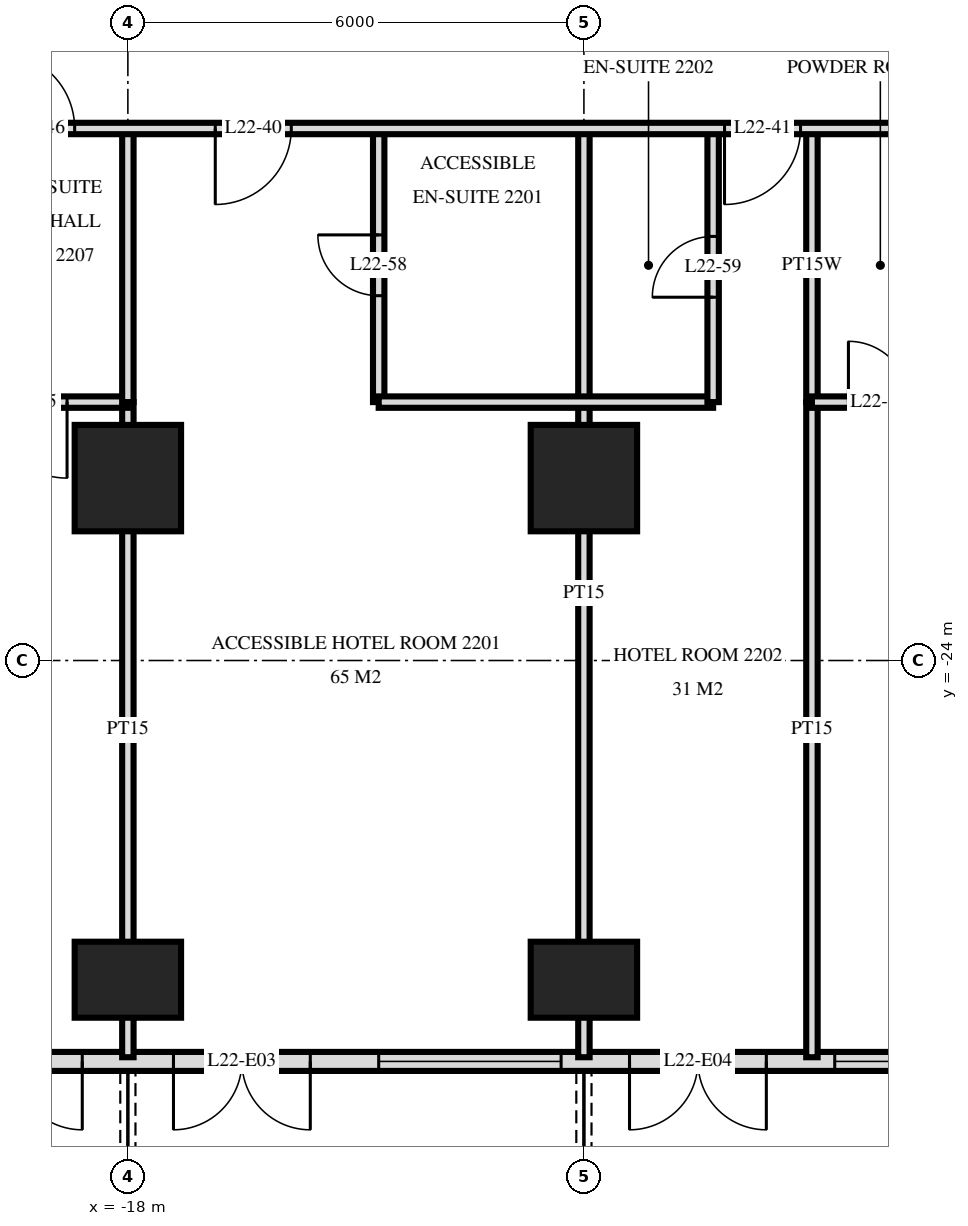
"""IFC4 building model, lengths in metres.
Left out: names, types, materials, properties, quantities, classifications, styles, units other than length and angle.
Written with IfcOpenShell. Run it as: python <this file> out.ifc"""

import sys

from ifc_helpers import new_model, si_unit, direction, frame, frame_2d, origin, origin_2d, place, context, subcontext, project, spatial, rectangle, extrude, element, fill, save


model = new_model("IFC4")
c1 = context("Model", 3, precision=1e-05, world=origin(), true_north=direction((0.0, 1.0)))
c2 = subcontext(c1, "Body", "Model", "MODEL_VIEW")
j1 = project(units=[si_unit("LENGTHUNIT", "METRE"), si_unit("PLANEANGLEUNIT", "RADIAN")], contexts=[c1])
p1 = place(None, origin())
s1 = spatial("IfcSite", under=j1, at=p1, CompositionType="ELEMENT")
p2 = place(p1, origin())
s2 = spatial("IfcBuilding", under=s1, at=p2, CompositionType="ELEMENT")
p3 = place(p2, frame((0.0, 0.0, 88.8)))
s3 = spatial("IfcBuildingStorey", under=s2, at=p3, CompositionType="ELEMENT", Elevation=88.8)
p4 = place(p3, frame((-18.0, -28.2, 0.0), z_axis=(0.0, 0.0, 1.0), x_axis=(1.0, 0.0, 0.0)))
e1 = element("IfcColumn", 1, at=p4, inside=s3, PredefinedType="COLUMN", context=c2, shape_type="SweptSolid", body=[
    extrude(rectangle(XDim=1.4, YDim=1.0, at=origin_2d()), origin(), (0.0, 0.0, 1.0), 3.6),
])
p5 = place(p3, frame((-18.0, -21.6, 0.0), z_axis=(0.0, 0.0, 1.0), x_axis=(1.0, 0.0, 0.0)))
e2 = element("IfcColumn", 2, at=p5, inside=s3, PredefinedType="COLUMN", context=c2, shape_type="SweptSolid", body=[
    extrude(rectangle(XDim=1.4, YDim=1.4, at=origin_2d()), origin(), (0.0, 0.0, 1.0), 3.6),
])
p6 = place(p3, frame((-12.0, -28.2, 0.0), z_axis=(0.0, 0.0, 1.0), x_axis=(1.0, 0.0, 0.0)))
e3 = element("IfcColumn", 3, at=p6, inside=s3, PredefinedType="COLUMN", context=c2, shape_type="SweptSolid", body=[
    extrude(rectangle(XDim=1.4, YDim=1.0, at=origin_2d()), origin(), (0.0, 0.0, 1.0), 3.6),
])
p7 = place(p3, frame((-12.0, -21.6, 0.0), z_axis=(0.0, 0.0, 1.0), x_axis=(1.0, 0.0, 0.0)))
e4 = element("IfcColumn", 4, at=p7, inside=s3, PredefinedType="COLUMN", context=c2, shape_type="SweptSolid", body=[
    extrude(rectangle(XDim=1.4, YDim=1.4, at=origin_2d()), origin(), (0.0, 0.0, 1.0), 3.6),
])
p8 = place(p3, frame((-28.775, -29.275, 0.0), z_axis=(0.0, 0.0, 1.0), x_axis=(1.0, 0.0, 0.0)))
e5 = element("IfcWall", 5, at=p8, inside=s3, PredefinedType="SOLIDWALL", context=c2, shape_type="SweptSolid", body=[
    extrude(rectangle(XDim=57.551, YDim=0.25, at=frame_2d((28.775, 0.0))), origin(), (0.0, 0.0, 1.0), 3.32),
])
p9 = place(p8, frame((0.575, 0.0, 0.0)))
e6 = element("IfcOpeningElement", 6, at=p9, cuts=e5, PredefinedType="OPENING", context=c2, shape_type="SweptSolid", body=[
    extrude(rectangle(XDim=1.8, YDim=2.4, at=frame_2d((0.9, 1.2))), frame((0.0, 0.135, 0.0), z_axis=(0.0, -1.0, 0.0), x_axis=(1.0, 0.0, 0.0)), (0.0, 0.0, 1.0), 0.27),
])
p10 = place(p8, frame((5.075, 0.0, 0.3)))
e7 = element("IfcOpeningElement", 7, at=p10, cuts=e5, PredefinedType="OPENING", context=c2, shape_type="SweptSolid", body=[
    extrude(rectangle(XDim=2.4, YDim=2.1, at=frame_2d((1.2, 1.05))), frame((0.0, 0.135, 0.0), z_axis=(0.0, -1.0, 0.0), x_axis=(1.0, 0.0, 0.0)), (0.0, 0.0, 1.0), 0.27),
])
p11 = place(p8, frame((8.375, 0.0, 0.0)))
e8 = element("IfcOpeningElement", 8, at=p11, cuts=e5, PredefinedType="OPENING", context=c2, shape_type="SweptSolid", body=[
    extrude(rectangle(XDim=1.8, YDim=2.4, at=frame_2d((0.9, 1.2))), frame((0.0, 0.135, 0.0), z_axis=(0.0, -1.0, 0.0), x_axis=(1.0, 0.0, 0.0)), (0.0, 0.0, 1.0), 0.27),
])
p12 = place(p8, frame((11.375, 0.0, 0.0)))
e9 = element("IfcOpeningElement", 9, at=p12, cuts=e5, PredefinedType="OPENING", context=c2, shape_type="SweptSolid", body=[
    extrude(rectangle(XDim=1.8, YDim=2.4, at=frame_2d((0.9, 1.2))), frame((0.0, 0.135, 0.0), z_axis=(0.0, -1.0, 0.0), x_axis=(1.0, 0.0, 0.0)), (0.0, 0.0, 1.0), 0.27),
])
p13 = place(p8, frame((14.075, 0.0, 0.3)))
e10 = element("IfcOpeningElement", 10, at=p13, cuts=e5, PredefinedType="OPENING", context=c2, shape_type="SweptSolid", body=[
    extrude(rectangle(XDim=2.4, YDim=2.1, at=frame_2d((1.2, 1.05))), frame((0.0, 0.135, 0.0), z_axis=(0.0, -1.0, 0.0), x_axis=(1.0, 0.0, 0.0)), (0.0, 0.0, 1.0), 0.27),
])
p14 = place(p8, frame((17.375, 0.0, 0.0)))
e11 = element("IfcOpeningElement", 11, at=p14, cuts=e5, PredefinedType="OPENING", context=c2, shape_type="SweptSolid", body=[
    extrude(rectangle(XDim=1.8, YDim=2.4, at=frame_2d((0.9, 1.2))), frame((0.0, 0.135, 0.0), z_axis=(0.0, -1.0, 0.0), x_axis=(1.0, 0.0, 0.0)), (0.0, 0.0, 1.0), 0.27),
])
p15 = place(p8, frame((20.075, 0.0, 0.3)))
e12 = element("IfcOpeningElement", 12, at=p15, cuts=e5, PredefinedType="OPENING", context=c2, shape_type="SweptSolid", body=[
    extrude(rectangle(XDim=2.4, YDim=2.1, at=frame_2d((1.2, 1.05))), frame((0.0, 0.135, 0.0), z_axis=(0.0, -1.0, 0.0), x_axis=(1.0, 0.0, 0.0)), (0.0, 0.0, 1.0), 0.27),
])
p16 = place(p8, frame((23.075, 0.0, 0.3)))
e13 = element("IfcOpeningElement", 13, at=p16, cuts=e5, PredefinedType="OPENING", context=c2, shape_type="SweptSolid", body=[
    extrude(rectangle(XDim=2.4, YDim=2.1, at=frame_2d((1.2, 1.05))), frame((0.0, 0.135, 0.0), z_axis=(0.0, -1.0, 0.0), x_axis=(1.0, 0.0, 0.0)), (0.0, 0.0, 1.0), 0.27),
])
p17 = place(p8, frame((26.375, 0.0, 0.0)))
e14 = element("IfcOpeningElement", 14, at=p17, cuts=e5, PredefinedType="OPENING", context=c2, shape_type="SweptSolid", body=[
    extrude(rectangle(XDim=1.8, YDim=2.4, at=frame_2d((0.9, 1.2))), frame((0.0, 0.135, 0.0), z_axis=(0.0, -1.0, 0.0), x_axis=(1.0, 0.0, 0.0)), (0.0, 0.0, 1.0), 0.27),
])
p18 = place(p8, frame((29.375, 0.0, 0.0)))
e15 = element("IfcOpeningElement", 15, at=p18, cuts=e5, PredefinedType="OPENING", context=c2, shape_type="SweptSolid", body=[
    extrude(rectangle(XDim=1.8, YDim=2.4, at=frame_2d((0.9, 1.2))), frame((0.0, 0.135, 0.0), z_axis=(0.0, -1.0, 0.0), x_axis=(1.0, 0.0, 0.0)), (0.0, 0.0, 1.0), 0.27),
])
p19 = place(p8, frame((32.075, 0.0, 0.3)))
e16 = element("IfcOpeningElement", 16, at=p19, cuts=e5, PredefinedType="OPENING", context=c2, shape_type="SweptSolid", body=[
    extrude(rectangle(XDim=2.4, YDim=2.1, at=frame_2d((1.2, 1.05))), frame((0.0, 0.135, 0.0), z_axis=(0.0, -1.0, 0.0), x_axis=(1.0, 0.0, 0.0)), (0.0, 0.0, 1.0), 0.27),
])
p20 = place(p8, frame((35.375, 0.0, 0.0)))
e17 = element("IfcOpeningElement", 17, at=p20, cuts=e5, PredefinedType="OPENING", context=c2, shape_type="SweptSolid", body=[
    extrude(rectangle(XDim=1.8, YDim=2.4, at=frame_2d((0.9, 1.2))), frame((0.0, 0.135, 0.0), z_axis=(0.0, -1.0, 0.0), x_axis=(1.0, 0.0, 0.0)), (0.0, 0.0, 1.0), 0.27),
])
p21 = place(p8, frame((38.075, 0.0, 0.3)))
e18 = element("IfcOpeningElement", 18, at=p21, cuts=e5, PredefinedType="OPENING", context=c2, shape_type="SweptSolid", body=[
    extrude(rectangle(XDim=2.4, YDim=2.1, at=frame_2d((1.2, 1.05))), frame((0.0, 0.135, 0.0), z_axis=(0.0, -1.0, 0.0), x_axis=(1.0, 0.0, 0.0)), (0.0, 0.0, 1.0), 0.27),
])
p22 = place(p8, frame((41.075, 0.0, 0.3)))
e19 = element("IfcOpeningElement", 19, at=p22, cuts=e5, PredefinedType="OPENING", context=c2, shape_type="SweptSolid", body=[
    extrude(rectangle(XDim=2.4, YDim=2.1, at=frame_2d((1.2, 1.05))), frame((0.0, 0.135, 0.0), z_axis=(0.0, -1.0, 0.0), x_axis=(1.0, 0.0, 0.0)), (0.0, 0.0, 1.0), 0.27),
])
p23 = place(p8, frame((44.375, 0.0, 0.0)))
e20 = element("IfcOpeningElement", 20, at=p23, cuts=e5, PredefinedType="OPENING", context=c2, shape_type="SweptSolid", body=[
    extrude(rectangle(XDim=1.8, YDim=2.4, at=frame_2d((0.9, 1.2))), frame((0.0, 0.135, 0.0), z_axis=(0.0, -1.0, 0.0), x_axis=(1.0, 0.0, 0.0)), (0.0, 0.0, 1.0), 0.27),
])
p24 = place(p8, frame((47.075, 0.0, 0.3)))
e21 = element("IfcOpeningElement", 21, at=p24, cuts=e5, PredefinedType="OPENING", context=c2, shape_type="SweptSolid", body=[
    extrude(rectangle(XDim=2.4, YDim=2.1, at=frame_2d((1.2, 1.05))), frame((0.0, 0.135, 0.0), z_axis=(0.0, -1.0, 0.0), x_axis=(1.0, 0.0, 0.0)), (0.0, 0.0, 1.0), 0.27),
])
p25 = place(p8, frame((50.375, 0.0, 0.0)))
e22 = element("IfcOpeningElement", 22, at=p25, cuts=e5, PredefinedType="OPENING", context=c2, shape_type="SweptSolid", body=[
    extrude(rectangle(XDim=1.8, YDim=2.4, at=frame_2d((0.9, 1.2))), frame((0.0, 0.135, 0.0), z_axis=(0.0, -1.0, 0.0), x_axis=(1.0, 0.0, 0.0)), (0.0, 0.0, 1.0), 0.27),
])
p26 = place(p8, frame((53.375, 0.0, 0.0)))
e23 = element("IfcOpeningElement", 23, at=p26, cuts=e5, PredefinedType="OPENING", context=c2, shape_type="SweptSolid", body=[
    extrude(rectangle(XDim=1.8, YDim=2.4, at=frame_2d((0.9, 1.2))), frame((0.0, 0.135, 0.0), z_axis=(0.0, -1.0, 0.0), x_axis=(1.0, 0.0, 0.0)), (0.0, 0.0, 1.0), 0.27),
])
p27 = place(p3, frame((-9.0, -29.22, 0.0), z_axis=(0.0, 0.0, 1.0), x_axis=(0.0, 1.0, 0.0)))
e24 = element("IfcWall", 24, at=p27, inside=s3, PredefinedType="PARTITIONING", context=c2, shape_type="SweptSolid", body=[
    extrude(rectangle(XDim=8.62, YDim=0.15, at=frame_2d((4.31, 0.0))), origin(), (0.0, 0.0, 1.0), 3.32),
])
p28 = place(p3, frame((-9.0, -20.6, 0.0), z_axis=(0.0, 0.0, 1.0), x_axis=(0.0, 1.0, 0.0)))
e25 = element("IfcWall", 25, at=p28, inside=s3, PredefinedType="PLUMBINGWALL", context=c2, shape_type="SweptSolid", body=[
    extrude(rectangle(XDim=3.6, YDim=0.15, at=frame_2d((1.8, 0.0))), origin(), (0.0, 0.0, 1.0), 3.32),
])
p29 = place(p3, frame((-10.3, -20.6, 0.0), z_axis=(0.0, 0.0, 1.0), x_axis=(0.0, 1.0, 0.0)))
e26 = element("IfcWall", 26, at=p29, inside=s3, PredefinedType="PARTITIONING", context=c2, shape_type="SweptSolid", body=[
    extrude(rectangle(XDim=3.6, YDim=0.15, at=frame_2d((1.8, 0.0))), origin(), (0.0, 0.0, 1.0), 3.32),
])
p30 = place(p29, frame((1.38, 0.0, 0.0)))
e27 = element("IfcOpeningElement", 27, at=p30, cuts=e26, PredefinedType="OPENING", context=c2, shape_type="SweptSolid", body=[
    extrude(rectangle(XDim=0.8, YDim=2.1, at=frame_2d((0.4, 1.05))), frame((0.0, 0.085, 0.0), z_axis=(0.0, -1.0, 0.0), x_axis=(1.0, 0.0, 0.0)), (0.0, 0.0, 1.0), 0.17),
])
p31 = place(p3, frame((-12.0, -29.22, 0.0), z_axis=(0.0, 0.0, 1.0), x_axis=(0.0, 1.0, 0.0)))
e28 = element("IfcWall", 28, at=p31, inside=s3, PredefinedType="PARTITIONING", context=c2, shape_type="SweptSolid", body=[
    extrude(rectangle(XDim=12.22, YDim=0.15, at=frame_2d((6.11, 0.0))), origin(), (0.0, 0.0, 1.0), 3.32),
])
p32 = place(p3, frame((-14.7, -20.6, 0.0), z_axis=(0.0, 0.0, 1.0), x_axis=(0.0, 1.0, 0.0)))
e29 = element("IfcWall", 29, at=p32, inside=s3, PredefinedType="PARTITIONING", context=c2, shape_type="SweptSolid", body=[
    extrude(rectangle(XDim=3.6, YDim=0.15, at=frame_2d((1.8, 0.0))), origin(), (0.0, 0.0, 1.0), 3.32),
])
p33 = place(p32, frame((1.4, 0.0, 0.0)))
e30 = element("IfcOpeningElement", 30, at=p33, cuts=e29, PredefinedType="OPENING", context=c2, shape_type="SweptSolid", body=[
    extrude(rectangle(XDim=0.8, YDim=2.1, at=frame_2d((0.4, 1.05))), frame((0.0, 0.085, 0.0), z_axis=(0.0, -1.0, 0.0), x_axis=(1.0, 0.0, 0.0)), (0.0, 0.0, 1.0), 0.17),
])
p34 = place(p3, frame((-18.0, -20.6, 0.0), z_axis=(0.0, 0.0, 1.0), x_axis=(0.0, 1.0, 0.0)))
e31 = element("IfcWall", 31, at=p34, inside=s3, PredefinedType="PARTITIONING", context=c2, shape_type="SweptSolid", body=[
    extrude(rectangle(XDim=3.6, YDim=0.15, at=frame_2d((1.8, 0.0))), origin(), (0.0, 0.0, 1.0), 3.32),
])
p35 = place(p3, frame((-18.0, -29.22, 0.0), z_axis=(0.0, 0.0, 1.0), x_axis=(0.0, 1.0, 0.0)))
e32 = element("IfcWall", 32, at=p35, inside=s3, PredefinedType="PARTITIONING", context=c2, shape_type="SweptSolid", body=[
    extrude(rectangle(XDim=8.62, YDim=0.15, at=frame_2d((4.31, 0.0))), origin(), (0.0, 0.0, 1.0), 3.32),
])
p36 = place(p3, frame((-20.4, -20.6, 0.0), z_axis=(0.0, 0.0, 1.0), x_axis=(1.0, 0.0, 0.0)))
e33 = element("IfcWall", 33, at=p36, inside=s3, PredefinedType="PARTITIONING", context=c2, shape_type="SweptSolid", body=[
    extrude(rectangle(XDim=2.4, YDim=0.15, at=frame_2d((1.2, 0.0))), origin(), (0.0, 0.0, 1.0), 3.32),
])
p37 = place(p36, frame((0.6, 0.0, 0.0)))
e34 = element("IfcOpeningElement", 34, at=p37, cuts=e33, PredefinedType="OPENING", context=c2, shape_type="SweptSolid", body=[
    extrude(rectangle(XDim=1.0, YDim=2.1, at=frame_2d((0.5, 1.05))), frame((0.0, 0.085, 0.0), z_axis=(0.0, -1.0, 0.0), x_axis=(1.0, 0.0, 0.0)), (0.0, 0.0, 1.0), 0.17),
])
p38 = place(p3, frame((-14.7, -20.6, 0.0), z_axis=(0.0, 0.0, 1.0), x_axis=(1.0, 0.0, 0.0)))
e35 = element("IfcWall", 35, at=p38, inside=s3, PredefinedType="PARTITIONING", context=c2, shape_type="SweptSolid", body=[
    extrude(rectangle(XDim=4.4, YDim=0.15, at=frame_2d((2.2, 0.0))), origin(), (0.0, 0.0, 1.0), 3.32),
])
p39 = place(p3, frame((-9.0, -20.6, 0.0), z_axis=(0.0, 0.0, 1.0), x_axis=(1.0, 0.0, 0.0)))
e36 = element("IfcWall", 36, at=p39, inside=s3, PredefinedType="PLUMBINGWALL", context=c2, shape_type="SweptSolid", body=[
    extrude(rectangle(XDim=1.8, YDim=0.15, at=frame_2d((0.9, 0.0))), origin(), (0.0, 0.0, 1.0), 3.32),
])
p40 = place(p39, frame((0.48, 0.0, 0.0)))
e37 = element("IfcOpeningElement", 37, at=p40, cuts=e36, PredefinedType="OPENING", context=c2, shape_type="SweptSolid", body=[
    extrude(rectangle(XDim=0.8, YDim=2.1, at=frame_2d((0.4, 1.05))), frame((0.0, 0.085, 0.0), z_axis=(0.0, -1.0, 0.0), x_axis=(1.0, 0.0, 0.0)), (0.0, 0.0, 1.0), 0.17),
])
p41 = place(p3, frame((-33.12, -17.0, 0.0), z_axis=(0.0, 0.0, 1.0), x_axis=(1.0, 0.0, 0.0)))
e38 = element("IfcWall", 38, at=p41, inside=s3, PredefinedType="PARTITIONING", context=c2, shape_type="SweptSolid", body=[
    extrude(rectangle(XDim=66.24, YDim=0.15, at=frame_2d((33.12, 0.0))), origin(), (0.0, 0.0, 1.0), 3.32),
])
p42 = place(p41, frame((16.27, 0.0, 0.0)))
e39 = element("IfcOpeningElement", 39, at=p42, cuts=e38, PredefinedType="OPENING", context=c2, shape_type="SweptSolid", body=[
    extrude(rectangle(XDim=1.0, YDim=2.1, at=frame_2d((0.5, 1.05))), frame((0.0, 0.085, 0.0), z_axis=(0.0, -1.0, 0.0), x_axis=(1.0, 0.0, 0.0)), (0.0, 0.0, 1.0), 0.17),
])
p43 = place(p41, frame((22.97, 0.0, 0.0)))
e40 = element("IfcOpeningElement", 40, at=p43, cuts=e38, PredefinedType="OPENING", context=c2, shape_type="SweptSolid", body=[
    extrude(rectangle(XDim=1.0, YDim=2.1, at=frame_2d((0.5, 1.05))), frame((0.0, 0.085, 0.0), z_axis=(0.0, -1.0, 0.0), x_axis=(1.0, 0.0, 0.0)), (0.0, 0.0, 1.0), 0.17),
])
p44 = place(p41, frame((34.42, 0.0, 0.0)))
e41 = element("IfcOpeningElement", 41, at=p44, cuts=e38, PredefinedType="OPENING", context=c2, shape_type="SweptSolid", body=[
    extrude(rectangle(XDim=1.0, YDim=2.1, at=frame_2d((0.5, 1.05))), frame((0.0, 0.085, 0.0), z_axis=(0.0, -1.0, 0.0), x_axis=(1.0, 0.0, 0.0)), (0.0, 0.0, 1.0), 0.17),
])
p45 = place(p41, frame((39.22, 0.0, 0.0)))
e42 = element("IfcOpeningElement", 42, at=p45, cuts=e38, PredefinedType="OPENING", context=c2, shape_type="SweptSolid", body=[
    extrude(rectangle(XDim=1.0, YDim=2.1, at=frame_2d((0.5, 1.05))), frame((0.0, 0.085, 0.0), z_axis=(0.0, -1.0, 0.0), x_axis=(1.0, 0.0, 0.0)), (0.0, 0.0, 1.0), 0.17),
])
p46 = place(p41, frame((42.27, 0.0, 0.0)))
e43 = element("IfcOpeningElement", 43, at=p46, cuts=e38, PredefinedType="OPENING", context=c2, shape_type="SweptSolid", body=[
    extrude(rectangle(XDim=1.0, YDim=2.1, at=frame_2d((0.5, 1.05))), frame((0.0, 0.085, 0.0), z_axis=(0.0, -1.0, 0.0), x_axis=(1.0, 0.0, 0.0)), (0.0, 0.0, 1.0), 0.17),
])
p47 = place(p41, frame((45.82, 0.0, 0.0)))
e44 = element("IfcOpeningElement", 44, at=p47, cuts=e38, PredefinedType="OPENING", context=c2, shape_type="SweptSolid", body=[
    extrude(rectangle(XDim=1.0, YDim=2.1, at=frame_2d((0.5, 1.05))), frame((0.0, 0.085, 0.0), z_axis=(0.0, -1.0, 0.0), x_axis=(1.0, 0.0, 0.0)), (0.0, 0.0, 1.0), 0.17),
])
p48 = place(p41, frame((13.42, 0.0, 0.0)))
e45 = element("IfcOpeningElement", 45, at=p48, cuts=e38, PredefinedType="OPENING", context=c2, shape_type="SweptSolid", body=[
    extrude(rectangle(XDim=1.0, YDim=2.1, at=frame_2d((0.5, 1.05))), frame((0.0, 0.085, 0.0), z_axis=(0.0, -1.0, 0.0), x_axis=(1.0, 0.0, 0.0)), (0.0, 0.0, 1.0), 0.17),
])
p49 = place(p41, frame((54.82, 0.0, 0.0)))
e46 = element("IfcOpeningElement", 46, at=p49, cuts=e38, PredefinedType="OPENING", context=c2, shape_type="SweptSolid", body=[
    extrude(rectangle(XDim=1.0, YDim=2.1, at=frame_2d((0.5, 1.05))), frame((0.0, 0.085, 0.0), z_axis=(0.0, -1.0, 0.0), x_axis=(1.0, 0.0, 0.0)), (0.0, 0.0, 1.0), 0.17),
])
p50 = place(p11, frame((0.9, 0.0, 0.0), z_axis=(0.0, 0.0, 1.0), x_axis=(-1.0, 0.0, 0.0)))
e47 = element("IfcDoor", 47, at=p50, inside=s3, OperationType="DOUBLE_DOOR_SINGLE_SWING", PredefinedType="DOOR", context=c2, shape_type="SweptSolid", body=[
    extrude(rectangle(XDim=1.8, YDim=2.4, at=frame_2d((0.0, 1.2))), frame((0.0, -0.025, 0.0), z_axis=(0.0, 1.0, 0.0), x_axis=(-1.0, 0.0, 0.0)), (0.0, 0.0, 1.0), 0.05),
])
fill(e8, e47)
p51 = place(p12, frame((0.9, 0.0, 0.0), z_axis=(0.0, 0.0, 1.0), x_axis=(-1.0, 0.0, 0.0)))
e48 = element("IfcDoor", 48, at=p51, inside=s3, OperationType="DOUBLE_DOOR_SINGLE_SWING", PredefinedType="DOOR", context=c2, shape_type="SweptSolid", body=[
    extrude(rectangle(XDim=1.8, YDim=2.4, at=frame_2d((0.0, 1.2))), frame((0.0, -0.025, 0.0), z_axis=(0.0, 1.0, 0.0), x_axis=(-1.0, 0.0, 0.0)), (0.0, 0.0, 1.0), 0.05),
])
fill(e9, e48)
p52 = place(p13, origin())
e49 = element("IfcWindow", 49, at=p52, inside=s3, PartitioningType="SINGLE_PANEL", PredefinedType="WINDOW", context=c2, shape_type="SweptSolid", body=[
    extrude(rectangle(XDim=2.4, YDim=2.1, at=frame_2d((1.2, 1.05))), frame((0.0, 0.03, 0.0), z_axis=(0.0, -1.0, 0.0), x_axis=(1.0, 0.0, 0.0)), (0.0, 0.0, 1.0), 0.06),
])
fill(e10, e49)
p53 = place(p14, frame((0.9, 0.0, 0.0), z_axis=(0.0, 0.0, 1.0), x_axis=(-1.0, 0.0, 0.0)))
e50 = element("IfcDoor", 50, at=p53, inside=s3, OperationType="DOUBLE_DOOR_SINGLE_SWING", PredefinedType="DOOR", context=c2, shape_type="SweptSolid", body=[
    extrude(rectangle(XDim=1.8, YDim=2.4, at=frame_2d((0.0, 1.2))), frame((0.0, -0.025, 0.0), z_axis=(0.0, 1.0, 0.0), x_axis=(-1.0, 0.0, 0.0)), (0.0, 0.0, 1.0), 0.05),
])
fill(e11, e50)
p54 = place(p15, origin())
e51 = element("IfcWindow", 51, at=p54, inside=s3, PartitioningType="SINGLE_PANEL", PredefinedType="WINDOW", context=c2, shape_type="SweptSolid", body=[
    extrude(rectangle(XDim=2.4, YDim=2.1, at=frame_2d((1.2, 1.05))), frame((0.0, 0.03, 0.0), z_axis=(0.0, -1.0, 0.0), x_axis=(1.0, 0.0, 0.0)), (0.0, 0.0, 1.0), 0.06),
])
fill(e12, e51)
p55 = place(p42, frame((0.5, 0.0, 0.0), z_axis=(0.0, 0.0, 1.0), x_axis=(-1.0, 0.0, 0.0)))
e52 = element("IfcDoor", 52, at=p55, inside=s3, OperationType="SINGLE_SWING_LEFT", PredefinedType="DOOR", context=c2, shape_type="SweptSolid", body=[
    extrude(rectangle(XDim=1.0, YDim=2.1, at=frame_2d((0.0, 1.05))), frame((0.0, -0.025, 0.0), z_axis=(0.0, 1.0, 0.0), x_axis=(-1.0, 0.0, 0.0)), (0.0, 0.0, 1.0), 0.05),
])
fill(e39, e52)
p56 = place(p43, frame((0.5, 0.0, 0.0), z_axis=(0.0, 0.0, 1.0), x_axis=(-1.0, 0.0, 0.0)))
e53 = element("IfcDoor", 53, at=p56, inside=s3, OperationType="SINGLE_SWING_LEFT", PredefinedType="DOOR", context=c2, shape_type="SweptSolid", body=[
    extrude(rectangle(XDim=1.0, YDim=2.1, at=frame_2d((0.0, 1.05))), frame((0.0, -0.025, 0.0), z_axis=(0.0, 1.0, 0.0), x_axis=(-1.0, 0.0, 0.0)), (0.0, 0.0, 1.0), 0.05),
])
fill(e40, e53)
p57 = place(p48, origin())
e54 = element("IfcDoor", 54, at=p57, inside=s3, OperationType="SINGLE_SWING_RIGHT", PredefinedType="DOOR", context=c2, shape_type="SweptSolid", body=[
    extrude(rectangle(XDim=1.0, YDim=2.1, at=frame_2d((0.5, 1.05))), frame((0.0, 0.025, 0.0), z_axis=(0.0, -1.0, 0.0), x_axis=(1.0, 0.0, 0.0)), (0.0, 0.0, 1.0), 0.05),
])
fill(e45, e54)
p58 = place(p33, origin())
e55 = element("IfcDoor", 55, at=p58, inside=s3, OperationType="SINGLE_SWING_LEFT", PredefinedType="DOOR", context=c2, shape_type="SweptSolid", body=[
    extrude(rectangle(XDim=0.8, YDim=2.1, at=frame_2d((0.4, 1.05))), frame((0.0, 0.025, 0.0), z_axis=(0.0, -1.0, 0.0), x_axis=(1.0, 0.0, 0.0)), (0.0, 0.0, 1.0), 0.05),
])
fill(e30, e55)
p59 = place(p30, origin())
e56 = element("IfcDoor", 56, at=p59, inside=s3, OperationType="SINGLE_SWING_RIGHT", PredefinedType="DOOR", context=c2, shape_type="SweptSolid", body=[
    extrude(rectangle(XDim=0.8, YDim=2.1, at=frame_2d((0.4, 1.05))), frame((0.0, 0.025, 0.0), z_axis=(0.0, -1.0, 0.0), x_axis=(1.0, 0.0, 0.0)), (0.0, 0.0, 1.0), 0.05),
])
fill(e27, e56)
p60 = place(p40, origin())
e57 = element("IfcDoor", 57, at=p60, inside=s3, OperationType="SINGLE_SWING_RIGHT", PredefinedType="DOOR", context=c2, shape_type="SweptSolid", body=[
    extrude(rectangle(XDim=0.8, YDim=2.1, at=frame_2d((0.4, 1.05))), frame((0.0, 0.025, 0.0), z_axis=(0.0, -1.0, 0.0), x_axis=(1.0, 0.0, 0.0)), (0.0, 0.0, 1.0), 0.05),
])
fill(e37, e57)
p61 = place(p37, frame((0.5, 0.0, 0.0), z_axis=(0.0, 0.0, 1.0), x_axis=(-1.0, 0.0, 0.0)))
e58 = element("IfcDoor", 58, at=p61, inside=s3, OperationType="SINGLE_SWING_RIGHT", PredefinedType="DOOR", context=c2, shape_type="SweptSolid", body=[
    extrude(rectangle(XDim=1.0, YDim=2.1, at=frame_2d((0.0, 1.05))), frame((0.0, -0.025, 0.0), z_axis=(0.0, 1.0, 0.0), x_axis=(-1.0, 0.0, 0.0)), (0.0, 0.0, 1.0), 0.05),
])
fill(e34, e58)
save(model, sys.argv[1])
